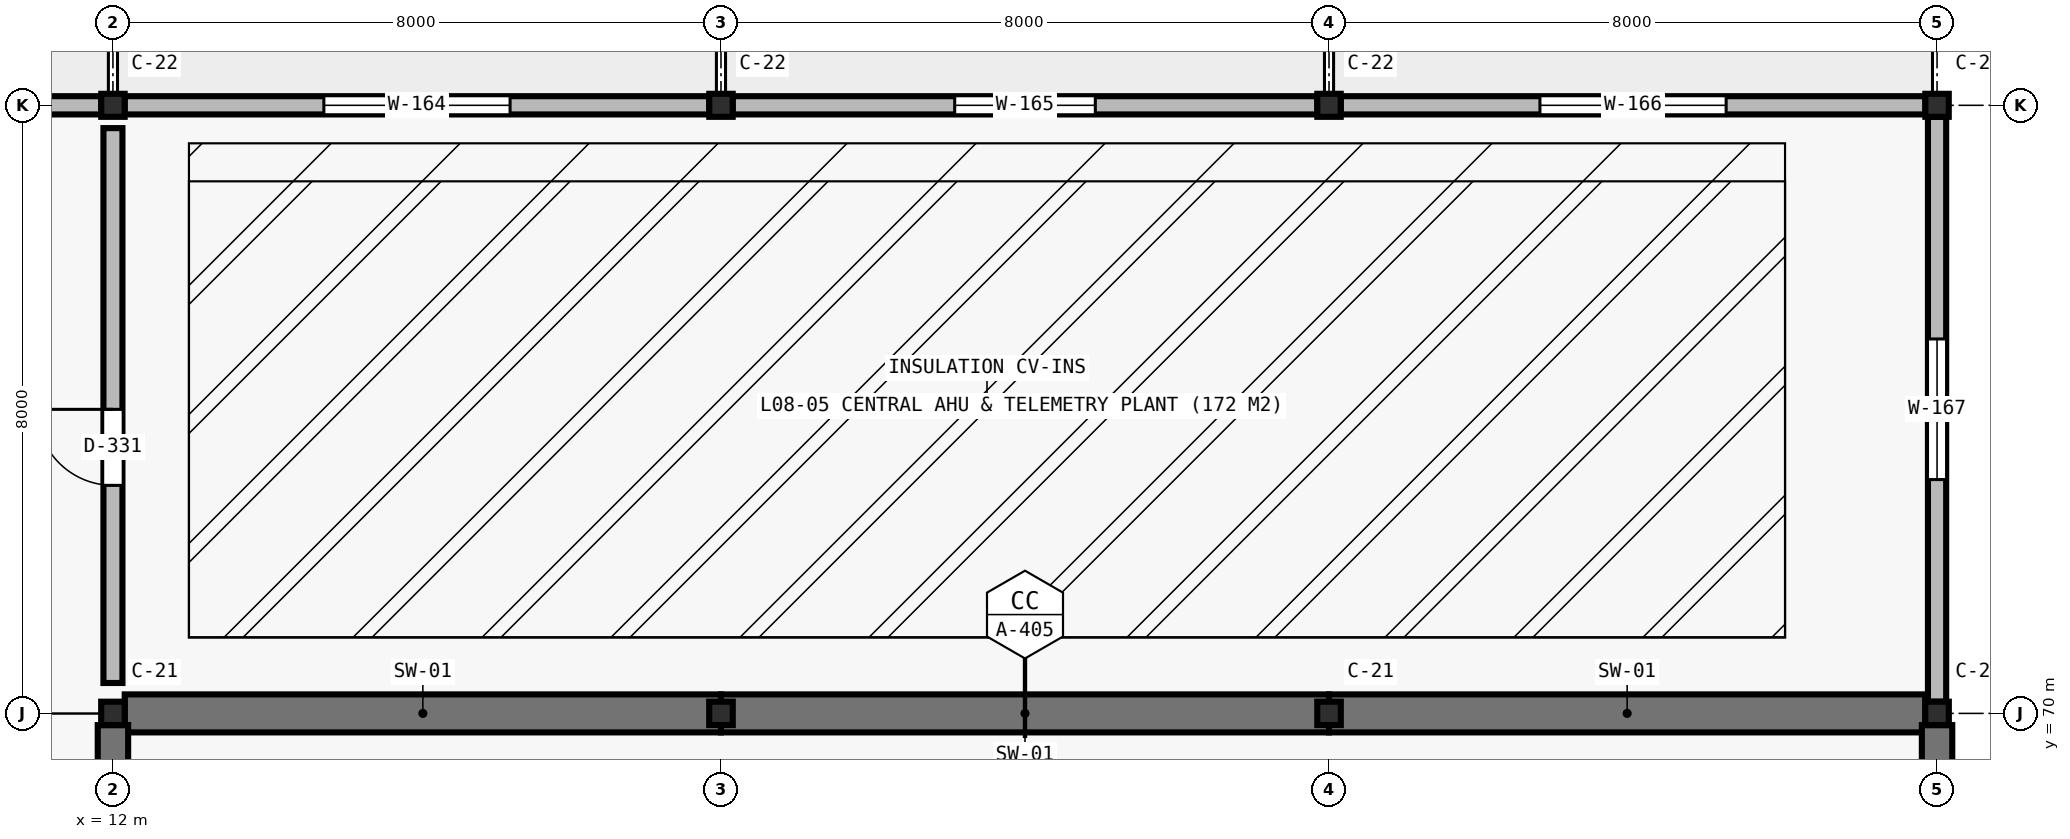
"""IFC4 building model, lengths in metres.
Left out: names, types, materials, properties, quantities, classifications, styles, units other than length and angle.
Written with IfcOpenShell. Run it as: python <this file> out.ifc"""

import sys

from ifc_helpers import new_model, si_unit, direction, frame, frame_2d, origin, origin_2d, place, context, subcontext, project, spatial, rectangle, i_section, extrude, element, fill, save


model = new_model("IFC4")
c1 = context("Model", 3, precision=1e-05, world=origin(), true_north=direction((0.0, 1.0)))
c2 = subcontext(c1, "Body", "Model", "MODEL_VIEW")
j1 = project(units=[si_unit("LENGTHUNIT", "METRE"), si_unit("PLANEANGLEUNIT", "RADIAN")], contexts=[c1])
p1 = place(None, origin())
s1 = spatial("IfcSite", under=j1, at=p1, CompositionType="ELEMENT")
p2 = place(p1, origin())
s2 = spatial("IfcBuilding", under=s1, at=p2, CompositionType="ELEMENT")
p3 = place(p2, frame((0.0, 0.0, 36.4)))
s3 = spatial("IfcBuildingStorey", under=s2, at=p3, CompositionType="ELEMENT", Elevation=36.4)
p4 = place(p3, frame((12.0, 70.0, 0.0), z_axis=(0.0, 0.0, 1.0), x_axis=(1.0, 0.0, 0.0)))
e1 = element("IfcColumn", 1, at=p4, inside=s3, PredefinedType="COLUMN", context=c2, shape_type="SweptSolid", body=[
    extrude(i_section(OverallWidth=0.31, OverallDepth=0.308, WebThickness=0.015, FlangeThickness=0.015, at=origin_2d()), origin(), (0.0, 0.0, 1.0), 3.98),
])
p5 = place(p3, frame((12.0, 78.0, 0.0), z_axis=(0.0, 0.0, 1.0), x_axis=(1.0, 0.0, 0.0)))
e2 = element("IfcColumn", 2, at=p5, inside=s3, PredefinedType="COLUMN", context=c2, shape_type="SweptSolid", body=[
    extrude(i_section(OverallWidth=0.308, OverallDepth=0.303, WebThickness=0.013, FlangeThickness=0.013, at=origin_2d()), origin(), (0.0, 0.0, 1.0), 3.98),
])
p6 = place(p3, frame((20.0, 70.0, 0.0), z_axis=(0.0, 0.0, 1.0), x_axis=(1.0, 0.0, 0.0)))
e3 = element("IfcColumn", 3, at=p6, inside=s3, PredefinedType="COLUMN", context=c2, shape_type="SweptSolid", body=[
    extrude(i_section(OverallWidth=0.31, OverallDepth=0.308, WebThickness=0.015, FlangeThickness=0.015, at=origin_2d()), origin(), (0.0, 0.0, 1.0), 3.98),
])
p7 = place(p3, frame((20.0, 78.0, 0.0), z_axis=(0.0, 0.0, 1.0), x_axis=(1.0, 0.0, 0.0)))
e4 = element("IfcColumn", 4, at=p7, inside=s3, PredefinedType="COLUMN", context=c2, shape_type="SweptSolid", body=[
    extrude(i_section(OverallWidth=0.308, OverallDepth=0.303, WebThickness=0.013, FlangeThickness=0.013, at=origin_2d()), origin(), (0.0, 0.0, 1.0), 3.98),
])
p8 = place(p3, frame((28.0, 70.0, 0.0), z_axis=(0.0, 0.0, 1.0), x_axis=(1.0, 0.0, 0.0)))
e5 = element("IfcColumn", 5, at=p8, inside=s3, PredefinedType="COLUMN", context=c2, shape_type="SweptSolid", body=[
    extrude(i_section(OverallWidth=0.31, OverallDepth=0.308, WebThickness=0.015, FlangeThickness=0.015, at=origin_2d()), origin(), (0.0, 0.0, 1.0), 3.98),
])
p9 = place(p3, frame((28.0, 78.0, 0.0), z_axis=(0.0, 0.0, 1.0), x_axis=(1.0, 0.0, 0.0)))
e6 = element("IfcColumn", 6, at=p9, inside=s3, PredefinedType="COLUMN", context=c2, shape_type="SweptSolid", body=[
    extrude(i_section(OverallWidth=0.308, OverallDepth=0.303, WebThickness=0.013, FlangeThickness=0.013, at=origin_2d()), origin(), (0.0, 0.0, 1.0), 3.98),
])
p10 = place(p3, frame((36.0, 70.0, 0.0), z_axis=(0.0, 0.0, 1.0), x_axis=(1.0, 0.0, 0.0)))
e7 = element("IfcColumn", 7, at=p10, inside=s3, PredefinedType="COLUMN", context=c2, shape_type="SweptSolid", body=[
    extrude(i_section(OverallWidth=0.31, OverallDepth=0.308, WebThickness=0.015, FlangeThickness=0.015, at=origin_2d()), origin(), (0.0, 0.0, 1.0), 3.98),
])
p11 = place(p3, frame((36.0, 78.0, 0.0), z_axis=(0.0, 0.0, 1.0), x_axis=(1.0, 0.0, 0.0)))
e8 = element("IfcColumn", 8, at=p11, inside=s3, PredefinedType="COLUMN", context=c2, shape_type="SweptSolid", body=[
    extrude(i_section(OverallWidth=0.308, OverallDepth=0.303, WebThickness=0.013, FlangeThickness=0.013, at=origin_2d()), origin(), (0.0, 0.0, 1.0), 3.98),
])
p12 = place(p3, frame((12.155, 70.0, 0.0), z_axis=(0.0, 0.0, 1.0), x_axis=(1.0, 0.0, 0.0)))
e9 = element("IfcWall", 9, at=p12, inside=s3, PredefinedType="SHEAR", context=c2, shape_type="SweptSolid", body=[
    extrude(rectangle(XDim=7.845, YDim=0.5, at=frame_2d((3.922, 0.0))), origin(), (0.0, 0.0, 1.0), 3.98),
])
p13 = place(p3, frame((20.0, 70.0, 0.0), z_axis=(0.0, 0.0, 1.0), x_axis=(1.0, 0.0, 0.0)))
e10 = element("IfcWall", 10, at=p13, inside=s3, PredefinedType="SHEAR", context=c2, shape_type="SweptSolid", body=[
    extrude(rectangle(XDim=8.0, YDim=0.5, at=frame_2d((4.0, 0.0))), origin(), (0.0, 0.0, 1.0), 3.98),
])
p14 = place(p3, frame((28.0, 70.0, 0.0), z_axis=(0.0, 0.0, 1.0), x_axis=(1.0, 0.0, 0.0)))
e11 = element("IfcWall", 11, at=p14, inside=s3, PredefinedType="SHEAR", context=c2, shape_type="SweptSolid", body=[
    extrude(rectangle(XDim=7.845, YDim=0.5, at=frame_2d((3.922, 0.0))), origin(), (0.0, 0.0, 1.0), 3.98),
])
p15 = place(p3, frame((12.0, 62.154, 0.0), z_axis=(0.0, 0.0, 1.0), x_axis=(0.0, 1.0, 0.0)))
e12 = element("IfcWall", 12, at=p15, inside=s3, PredefinedType="SHEAR", context=c2, shape_type="SweptSolid", body=[
    extrude(rectangle(XDim=7.692, YDim=0.4, at=frame_2d((3.846, 0.0))), origin(), (0.0, 0.0, 1.0), 3.98),
])
p16 = place(p15, frame((0.746, 0.0, 0.0)))
e13 = element("IfcOpeningElement", 13, at=p16, cuts=e12, PredefinedType="OPENING", context=c2, shape_type="SweptSolid", body=[
    extrude(rectangle(XDim=1.8, YDim=2.2, at=frame_2d((0.9, 1.1))), frame((0.0, 0.21, 0.0), z_axis=(0.0, -1.0, 0.0), x_axis=(1.0, 0.0, 0.0)), (0.0, 0.0, 1.0), 0.42),
])
p17 = place(p3, frame((36.0, 62.154, 0.0), z_axis=(0.0, 0.0, 1.0), x_axis=(0.0, 1.0, 0.0)))
e14 = element("IfcWall", 14, at=p17, inside=s3, PredefinedType="SHEAR", context=c2, shape_type="SweptSolid", body=[
    extrude(rectangle(XDim=7.692, YDim=0.4, at=frame_2d((3.846, 0.0))), origin(), (0.0, 0.0, 1.0), 3.98),
])
p18 = place(p17, frame((2.1, 0.0, 0.95)))
e15 = element("IfcOpeningElement", 15, at=p18, cuts=e14, PredefinedType="OPENING", context=c2, shape_type="SweptSolid", body=[
    extrude(rectangle(XDim=1.1, YDim=2.3, at=frame_2d((0.55, 1.15))), frame((0.0, 0.21, 0.0), z_axis=(0.0, -1.0, 0.0), x_axis=(1.0, 0.0, 0.0)), (0.0, 0.0, 1.0), 0.42),
])
p19 = place(p3, frame((4.154, 78.0, 0.0), z_axis=(0.0, 0.0, 1.0), x_axis=(1.0, 0.0, 0.0)))
e16 = element("IfcWall", 16, at=p19, inside=s3, PredefinedType="STANDARD", context=c2, shape_type="SweptSolid", body=[
    extrude(rectangle(XDim=7.692, YDim=0.24, at=frame_2d((3.846, 0.0))), origin(), (0.0, 0.0, 1.0), 3.573),
])
p20 = place(p19, frame((2.921, 0.0, 0.95)))
e17 = element("IfcOpeningElement", 17, at=p20, cuts=e16, PredefinedType="OPENING", context=c2, shape_type="SweptSolid", body=[
    extrude(rectangle(XDim=1.85, YDim=1.25, at=frame_2d((0.925, 0.625))), frame((0.0, 0.13, 0.0), z_axis=(0.0, -1.0, 0.0), x_axis=(1.0, 0.0, 0.0)), (0.0, 0.0, 1.0), 0.26),
])
p21 = place(p3, frame((12.154, 78.0, 0.0), z_axis=(0.0, 0.0, 1.0), x_axis=(1.0, 0.0, 0.0)))
e18 = element("IfcWall", 18, at=p21, inside=s3, PredefinedType="STANDARD", context=c2, shape_type="SweptSolid", body=[
    extrude(rectangle(XDim=7.692, YDim=0.24, at=frame_2d((3.846, 0.0))), origin(), (0.0, 0.0, 1.0), 3.573),
])
p22 = place(p21, frame((2.621, 0.0, 0.95)))
e19 = element("IfcOpeningElement", 19, at=p22, cuts=e18, PredefinedType="OPENING", context=c2, shape_type="SweptSolid", body=[
    extrude(rectangle(XDim=2.45, YDim=1.35, at=frame_2d((1.225, 0.675))), frame((0.0, 0.13, 0.0), z_axis=(0.0, -1.0, 0.0), x_axis=(1.0, 0.0, 0.0)), (0.0, 0.0, 1.0), 0.26),
])
p23 = place(p3, frame((20.154, 78.0, 0.0), z_axis=(0.0, 0.0, 1.0), x_axis=(1.0, 0.0, 0.0)))
e20 = element("IfcWall", 20, at=p23, inside=s3, PredefinedType="STANDARD", context=c2, shape_type="SweptSolid", body=[
    extrude(rectangle(XDim=7.692, YDim=0.24, at=frame_2d((3.846, 0.0))), origin(), (0.0, 0.0, 1.0), 3.573),
])
p24 = place(p23, frame((2.921, 0.0, 0.95)))
e21 = element("IfcOpeningElement", 21, at=p24, cuts=e20, PredefinedType="OPENING", context=c2, shape_type="SweptSolid", body=[
    extrude(rectangle(XDim=1.85, YDim=1.25, at=frame_2d((0.925, 0.625))), frame((0.0, 0.13, 0.0), z_axis=(0.0, -1.0, 0.0), x_axis=(1.0, 0.0, 0.0)), (0.0, 0.0, 1.0), 0.26),
])
p25 = place(p3, frame((28.154, 78.0, 0.0), z_axis=(0.0, 0.0, 1.0), x_axis=(1.0, 0.0, 0.0)))
e22 = element("IfcWall", 22, at=p25, inside=s3, PredefinedType="STANDARD", context=c2, shape_type="SweptSolid", body=[
    extrude(rectangle(XDim=7.692, YDim=0.24, at=frame_2d((3.846, 0.0))), origin(), (0.0, 0.0, 1.0), 3.573),
])
p26 = place(p25, frame((2.621, 0.0, 0.95)))
e23 = element("IfcOpeningElement", 23, at=p26, cuts=e22, PredefinedType="OPENING", context=c2, shape_type="SweptSolid", body=[
    extrude(rectangle(XDim=2.45, YDim=1.35, at=frame_2d((1.225, 0.675))), frame((0.0, 0.13, 0.0), z_axis=(0.0, -1.0, 0.0), x_axis=(1.0, 0.0, 0.0)), (0.0, 0.0, 1.0), 0.26),
])
p27 = place(p3, frame((36.0, 77.848, 0.0), z_axis=(0.0, 0.0, 1.0), x_axis=(0.0, -1.0, 0.0)))
e24 = element("IfcWall", 24, at=p27, inside=s3, PredefinedType="STANDARD", context=c2, shape_type="SweptSolid", body=[
    extrude(rectangle(XDim=7.694, YDim=0.24, at=frame_2d((3.847, 0.0))), origin(), (0.0, 0.0, 1.0), 3.573),
])
p28 = place(p27, frame((2.922, 0.0, 0.95)))
e25 = element("IfcOpeningElement", 25, at=p28, cuts=e24, PredefinedType="OPENING", context=c2, shape_type="SweptSolid", body=[
    extrude(rectangle(XDim=1.85, YDim=1.25, at=frame_2d((0.925, 0.625))), frame((0.0, 0.13, 0.0), z_axis=(0.0, -1.0, 0.0), x_axis=(1.0, 0.0, 0.0)), (0.0, 0.0, 1.0), 0.26),
])
p29 = place(p3, frame((12.15, 77.85, 4.2), z_axis=(0.0, 0.0, 1.0), x_axis=(1.0, 0.0, 0.0)))
e26 = element("IfcWall", 26, at=p29, inside=s3, PredefinedType="PARAPET", context=c2, shape_type="SweptSolid", body=[
    extrude(rectangle(XDim=23.7, YDim=0.29, at=frame_2d((11.85, 0.0))), origin(), (0.0, 0.0, 1.0), 1.15),
])
for number, where, z_axis, x_axis in (
    (27, (35.85, 70.15, 4.2), (0.0, 0.0, 1.0), (0.0, 1.0, 0.0)),
    (28, (12.15, 70.15, 4.2), (0.0, 0.0, 1.0), (0.0, 1.0, 0.0)),
):
    element("IfcWall", number, at=place(p3, frame(where, z_axis=z_axis, x_axis=x_axis)), inside=s3, PredefinedType="PARAPET", context=c2, shape_type="SweptSolid", body=[
        extrude(rectangle(XDim=7.7, YDim=0.29, at=frame_2d((3.85, 0.0))), origin(), (0.0, 0.0, 1.0), 1.15),
    ])
p30 = place(p3, frame((12.15, 70.15, 4.2), z_axis=(0.0, 0.0, 1.0), x_axis=(1.0, 0.0, 0.0)))
e29 = element("IfcWall", 29, at=p30, inside=s3, PredefinedType="PARAPET", context=c2, shape_type="SweptSolid", body=[
    extrude(rectangle(XDim=23.7, YDim=0.29, at=frame_2d((11.85, 0.0))), origin(), (0.0, 0.0, 1.0), 1.15),
])
p31 = place(p3, frame((12.0, 70.4, 0.0), z_axis=(0.0, 0.0, 1.0), x_axis=(0.0, 1.0, 0.0)))
e30 = element("IfcWall", 30, at=p31, inside=s3, PredefinedType="SOLIDWALL", context=c2, shape_type="SweptSolid", body=[
    extrude(rectangle(XDim=7.3, YDim=0.25, at=frame_2d((3.65, 0.0))), origin(), (0.0, 0.0, 1.0), 3.573),
])
p32 = place(p31, frame((2.6, 0.0, 0.0)))
e31 = element("IfcOpeningElement", 31, at=p32, cuts=e30, PredefinedType="OPENING", context=c2, shape_type="SweptSolid", body=[
    extrude(rectangle(XDim=1.0, YDim=2.15, at=frame_2d((0.5, 1.075))), frame((0.0, 0.135, 0.0), z_axis=(0.0, -1.0, 0.0), x_axis=(1.0, 0.0, 0.0)), (0.0, 0.0, 1.0), 0.27),
])
p33 = place(p22, origin())
e32 = element("IfcWindow", 32, at=p33, inside=s3, PartitioningType="SINGLE_PANEL", PredefinedType="WINDOW", context=c2, shape_type="SweptSolid", body=[
    extrude(rectangle(XDim=2.45, YDim=1.35, at=frame_2d((1.225, 0.675))), frame((0.0, 0.03, 0.0), z_axis=(0.0, -1.0, 0.0), x_axis=(1.0, 0.0, 0.0)), (0.0, 0.0, 1.0), 0.06),
])
fill(e19, e32)
p34 = place(p24, origin())
e33 = element("IfcWindow", 33, at=p34, inside=s3, PartitioningType="SINGLE_PANEL", PredefinedType="WINDOW", context=c2, shape_type="SweptSolid", body=[
    extrude(rectangle(XDim=1.85, YDim=1.25, at=frame_2d((0.925, 0.625))), frame((0.0, 0.03, 0.0), z_axis=(0.0, -1.0, 0.0), x_axis=(1.0, 0.0, 0.0)), (0.0, 0.0, 1.0), 0.06),
])
fill(e21, e33)
p35 = place(p26, origin())
e34 = element("IfcWindow", 34, at=p35, inside=s3, PartitioningType="SINGLE_PANEL", PredefinedType="WINDOW", context=c2, shape_type="SweptSolid", body=[
    extrude(rectangle(XDim=2.45, YDim=1.35, at=frame_2d((1.225, 0.675))), frame((0.0, 0.03, 0.0), z_axis=(0.0, -1.0, 0.0), x_axis=(1.0, 0.0, 0.0)), (0.0, 0.0, 1.0), 0.06),
])
fill(e23, e34)
p36 = place(p28, origin())
e35 = element("IfcWindow", 35, at=p36, inside=s3, PartitioningType="SINGLE_PANEL", PredefinedType="WINDOW", context=c2, shape_type="SweptSolid", body=[
    extrude(rectangle(XDim=1.85, YDim=1.25, at=frame_2d((0.925, 0.625))), frame((0.0, 0.03, 0.0), z_axis=(0.0, -1.0, 0.0), x_axis=(1.0, 0.0, 0.0)), (0.0, 0.0, 1.0), 0.06),
])
fill(e25, e35)
p37 = place(p32, origin())
e36 = element("IfcDoor", 36, at=p37, inside=s3, OperationType="SINGLE_SWING_RIGHT", PredefinedType="DOOR", context=c2, shape_type="SweptSolid", body=[
    extrude(rectangle(XDim=1.0, YDim=2.15, at=frame_2d((0.5, 1.075))), frame((0.0, 0.025, 0.0), z_axis=(0.0, -1.0, 0.0), x_axis=(1.0, 0.0, 0.0)), (0.0, 0.0, 1.0), 0.05),
])
fill(e31, e36)
save(model, sys.argv[1])
